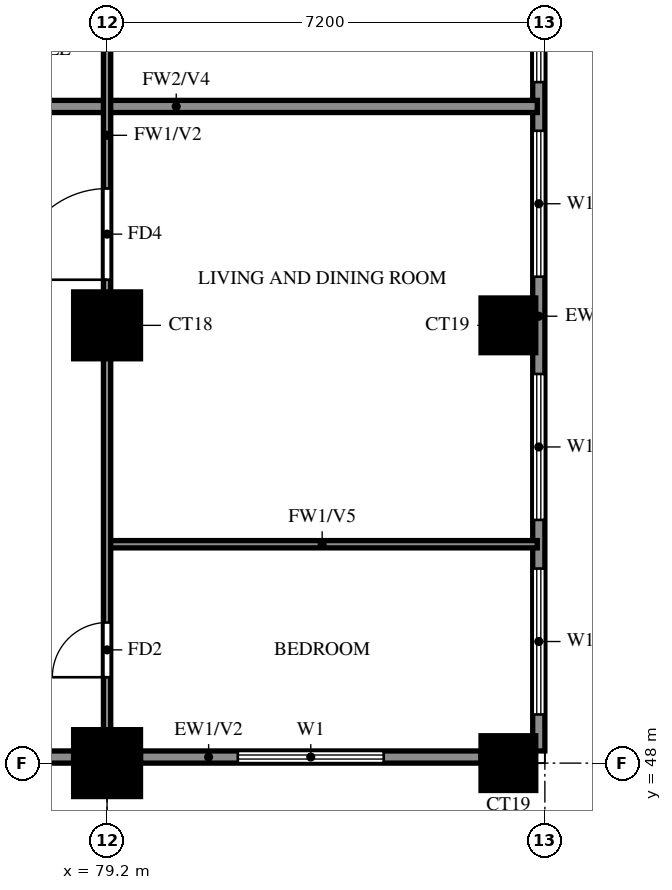
"""IFC4 building model, lengths in metres.
Left out: names, types, materials, properties, quantities, classifications, styles, units other than length and angle.
Written with IfcOpenShell. Run it as: python <this file> out.ifc"""

import sys

from ifc_helpers import new_model, si_unit, direction, frame, frame_2d, origin, origin_2d, place, context, subcontext, project, spatial, rectangle, extrude, source, transform, mapped, element, fill, save


model = new_model("IFC4")
c1 = context("Model", 3, precision=1e-05, world=origin(), true_north=direction((0.0, 1.0)))
c2 = subcontext(c1, "Body", "Model", "MODEL_VIEW")
j1 = project(units=[si_unit("LENGTHUNIT", "METRE"), si_unit("PLANEANGLEUNIT", "RADIAN")], contexts=[c1])
p1 = place(None, origin())
s1 = spatial("IfcSite", under=j1, at=p1, CompositionType="ELEMENT")
p2 = place(p1, origin())
s2 = spatial("IfcBuilding", under=s1, at=p2, CompositionType="ELEMENT")
p3 = place(p2, frame((0.0, 0.0, 116.5)))
s3 = spatial("IfcBuildingStorey", under=s2, at=p3, CompositionType="ELEMENT", Elevation=116.5)
m1 = source(origin(), c2, "Body", "SweptSolid", [
    extrude(rectangle(XDim=1.1, YDim=1.1, at=origin_2d()), origin(), (0.0, 0.0, 1.0), 3.2),
])
p4 = place(p3, frame((79.2, 48.0, 0.0), z_axis=(0.0, 0.0, 1.0), x_axis=(1.0, 0.0, 0.0)))
e1 = element("IfcColumn", 1, at=p4, inside=s3, PredefinedType="COLUMN", context=c2, shape_type="MappedRepresentation", body=[
    mapped(m1, transform((0.0, 0.0, 0.0))),
])
m2 = source(origin(), c2, "Body", "SweptSolid", [
    extrude(rectangle(XDim=0.9, YDim=0.9, at=origin_2d()), origin(), (0.0, 0.0, 1.0), 3.2),
])
p5 = place(p3, frame((85.8, 48.0, 0.0), z_axis=(0.0, 0.0, 1.0), x_axis=(1.0, 0.0, 0.0)))
e2 = element("IfcColumn", 2, at=p5, inside=s3, PredefinedType="COLUMN", context=c2, shape_type="MappedRepresentation", body=[
    mapped(m2, transform((0.0, 0.0, 0.0))),
])
p6 = place(p3, frame((79.2, 55.2, 0.0), z_axis=(0.0, 0.0, 1.0), x_axis=(1.0, 0.0, 0.0)))
e3 = element("IfcColumn", 3, at=p6, inside=s3, PredefinedType="COLUMN", context=c2, shape_type="MappedRepresentation", body=[
    mapped(m1, transform((0.0, 0.0, 0.0))),
])
p7 = place(p3, frame((85.8, 55.2, 0.0), z_axis=(0.0, 0.0, 1.0), x_axis=(1.0, 0.0, 0.0)))
e4 = element("IfcColumn", 4, at=p7, inside=s3, PredefinedType="COLUMN", context=c2, shape_type="MappedRepresentation", body=[
    mapped(m2, transform((0.0, 0.0, 0.0))),
])
p8 = place(p3, frame((85.719, 39.881, 0.0), z_axis=(0.0, 0.0, 1.0), x_axis=(-0.86377618652, 0.503875678716, 0.0)))
e5 = element("IfcWall", 5, at=p8, inside=s3, PredefinedType="SOLIDWALL", context=c2, shape_type="SweptSolid", body=[
    extrude(rectangle(XDim=16.311, YDim=0.2, at=frame_2d((8.156, 0.0))), origin(), (0.0, 0.0, 1.0), 3.2),
])
p9 = place(p8, frame((13.326, 0.0, 1.5)))
e6 = element("IfcOpeningElement", 6, at=p9, cuts=e5, PredefinedType="OPENING", context=c2, shape_type="SweptSolid", body=[
    extrude(rectangle(XDim=0.9, YDim=0.9, at=frame_2d((0.45, 0.45))), frame((0.0, 0.11, 0.0), z_axis=(0.0, -1.0, 0.0), x_axis=(1.0, 0.0, 0.0)), (0.0, 0.0, 1.0), 0.22),
])
p10 = place(p3, frame((71.99, 48.1, 0.0), z_axis=(0.0, 0.0, 1.0), x_axis=(1.0, 0.0, 0.0)))
e7 = element("IfcWall", 7, at=p10, inside=s3, PredefinedType="SOLIDWALL", context=c2, shape_type="SweptSolid", body=[
    extrude(rectangle(XDim=6.66, YDim=0.2, at=frame_2d((3.33, 0.0))), origin(), (0.0, 0.0, 1.0), 3.2),
])
p11 = place(p10, frame((2.205, 0.0, 1.5)))
e8 = element("IfcOpeningElement", 8, at=p11, cuts=e7, PredefinedType="OPENING", context=c2, shape_type="SweptSolid", body=[
    extrude(rectangle(XDim=0.9, YDim=0.9, at=frame_2d((0.45, 0.45))), frame((0.0, 0.11, 0.0), z_axis=(0.0, -1.0, 0.0), x_axis=(1.0, 0.0, 0.0)), (0.0, 0.0, 1.0), 0.22),
])
p12 = place(p3, frame((79.75, 48.1, 0.0), z_axis=(0.0, 0.0, 1.0), x_axis=(1.0, 0.0, 0.0)))
e9 = element("IfcWall", 9, at=p12, inside=s3, PredefinedType="SOLIDWALL", context=c2, shape_type="SweptSolid", body=[
    extrude(rectangle(XDim=5.6, YDim=0.2, at=frame_2d((2.8, 0.0))), origin(), (0.0, 0.0, 1.0), 3.2),
])
p13 = place(p12, frame((1.6, 0.0, 0.6)))
e10 = element("IfcOpeningElement", 10, at=p13, cuts=e9, PredefinedType="OPENING", context=c2, shape_type="SweptSolid", body=[
    extrude(rectangle(XDim=2.4, YDim=2.4, at=frame_2d((1.2, 1.2))), frame((0.0, 0.11, 0.0), z_axis=(0.0, -1.0, 0.0), x_axis=(1.0, 0.0, 0.0)), (0.0, 0.0, 1.0), 0.22),
])
p14 = place(p3, frame((86.3, 48.2, 0.0), z_axis=(0.0, 0.0, 1.0), x_axis=(0.0, 1.0, 0.0)))
e11 = element("IfcWall", 11, at=p14, inside=s3, PredefinedType="SOLIDWALL", context=c2, shape_type="SweptSolid", body=[
    extrude(rectangle(XDim=28.6, YDim=0.2, at=frame_2d((14.3, 0.0))), origin(), (0.0, 0.0, 1.0), 3.2),
])
p15 = place(p14, frame((0.6, 0.0, 0.6)))
e12 = element("IfcOpeningElement", 12, at=p15, cuts=e11, PredefinedType="OPENING", context=c2, shape_type="SweptSolid", body=[
    extrude(rectangle(XDim=2.4, YDim=2.4, at=frame_2d((1.2, 1.2))), frame((0.0, 0.11, 0.0), z_axis=(0.0, -1.0, 0.0), x_axis=(1.0, 0.0, 0.0)), (0.0, 0.0, 1.0), 0.22),
])
p16 = place(p14, frame((3.8, 0.0, 0.6)))
e13 = element("IfcOpeningElement", 13, at=p16, cuts=e11, PredefinedType="OPENING", context=c2, shape_type="SweptSolid", body=[
    extrude(rectangle(XDim=2.4, YDim=2.4, at=frame_2d((1.2, 1.2))), frame((0.0, 0.11, 0.0), z_axis=(0.0, -1.0, 0.0), x_axis=(1.0, 0.0, 0.0)), (0.0, 0.0, 1.0), 0.22),
])
p17 = place(p14, frame((7.8, 0.0, 0.6)))
e14 = element("IfcOpeningElement", 14, at=p17, cuts=e11, PredefinedType="OPENING", context=c2, shape_type="SweptSolid", body=[
    extrude(rectangle(XDim=2.4, YDim=2.4, at=frame_2d((1.2, 1.2))), frame((0.0, 0.11, 0.0), z_axis=(0.0, -1.0, 0.0), x_axis=(1.0, 0.0, 0.0)), (0.0, 0.0, 1.0), 0.22),
])
p18 = place(p14, frame((11.0, 0.0, 0.6)))
e15 = element("IfcOpeningElement", 15, at=p18, cuts=e11, PredefinedType="OPENING", context=c2, shape_type="SweptSolid", body=[
    extrude(rectangle(XDim=2.4, YDim=2.4, at=frame_2d((1.2, 1.2))), frame((0.0, 0.11, 0.0), z_axis=(0.0, -1.0, 0.0), x_axis=(1.0, 0.0, 0.0)), (0.0, 0.0, 1.0), 0.22),
])
p19 = place(p14, frame((15.167, 0.0, 0.6)))
e16 = element("IfcOpeningElement", 16, at=p19, cuts=e11, PredefinedType="OPENING", context=c2, shape_type="SweptSolid", body=[
    extrude(rectangle(XDim=2.4, YDim=2.4, at=frame_2d((1.2, 1.2))), frame((0.0, 0.11, 0.0), z_axis=(0.0, -1.0, 0.0), x_axis=(1.0, 0.0, 0.0)), (0.0, 0.0, 1.0), 0.22),
])
p20 = place(p14, frame((18.033, 0.0, 0.6)))
e17 = element("IfcOpeningElement", 17, at=p20, cuts=e11, PredefinedType="OPENING", context=c2, shape_type="SweptSolid", body=[
    extrude(rectangle(XDim=2.4, YDim=2.4, at=frame_2d((1.2, 1.2))), frame((0.0, 0.11, 0.0), z_axis=(0.0, -1.0, 0.0), x_axis=(1.0, 0.0, 0.0)), (0.0, 0.0, 1.0), 0.22),
])
p21 = place(p14, frame((22.95, 0.0, 1.5)))
e18 = element("IfcOpeningElement", 18, at=p21, cuts=e11, PredefinedType="OPENING", context=c2, shape_type="SweptSolid", body=[
    extrude(rectangle(XDim=0.9, YDim=0.9, at=frame_2d((0.45, 0.45))), frame((0.0, 0.11, 0.0), z_axis=(0.0, -1.0, 0.0), x_axis=(1.0, 0.0, 0.0)), (0.0, 0.0, 1.0), 0.22),
])
p22 = place(p14, frame((25.4, 0.0, 0.6)))
e19 = element("IfcOpeningElement", 19, at=p22, cuts=e11, PredefinedType="OPENING", context=c2, shape_type="SweptSolid", body=[
    extrude(rectangle(XDim=2.4, YDim=2.4, at=frame_2d((1.2, 1.2))), frame((0.0, 0.11, 0.0), z_axis=(0.0, -1.0, 0.0), x_axis=(1.0, 0.0, 0.0)), (0.0, 0.0, 1.0), 0.22),
])
p23 = place(p3, frame((74.4, 58.8, 0.0), z_axis=(0.0, 0.0, 1.0), x_axis=(1.0, 0.0, 0.0)))
e20 = element("IfcWall", 20, at=p23, inside=s3, PredefinedType="SOLIDWALL", context=c2, shape_type="SweptSolid", body=[
    extrude(rectangle(XDim=11.875, YDim=0.2, at=frame_2d((5.938, 0.0))), origin(), (0.0, 0.0, 1.0), 2.3),
])
p24 = place(p3, frame((79.2, 51.6, 0.0), z_axis=(0.0, 0.0, 1.0), x_axis=(1.0, 0.0, 0.0)))
e21 = element("IfcWall", 21, at=p24, inside=s3, PredefinedType="PARTITIONING", context=c2, shape_type="SweptSolid", body=[
    extrude(rectangle(XDim=7.075, YDim=0.12, at=frame_2d((3.538, 0.0))), origin(), (0.0, 0.0, 1.0), 2.3),
])
p25 = place(p3, frame((79.2, 48.125, 0.0), z_axis=(0.0, 0.0, 1.0), x_axis=(0.0, 1.0, 0.0)))
e22 = element("IfcWall", 22, at=p25, inside=s3, PredefinedType="PARTITIONING", context=c2, shape_type="SweptSolid", body=[
    extrude(rectangle(XDim=21.475, YDim=0.12, at=frame_2d((10.738, 0.0))), origin(), (0.0, 0.0, 1.0), 3.2),
])
p26 = place(p25, frame((1.288, 0.0, 0.0)))
e23 = element("IfcOpeningElement", 23, at=p26, cuts=e22, PredefinedType="OPENING", context=c2, shape_type="SweptSolid", body=[
    extrude(rectangle(XDim=0.9, YDim=2.1, at=frame_2d((0.45, 1.05))), frame((0.0, 0.07, 0.0), z_axis=(0.0, -1.0, 0.0), x_axis=(1.0, 0.0, 0.0)), (0.0, 0.0, 1.0), 0.14),
])
p27 = place(p25, frame((7.825, 0.0, 0.0)))
e24 = element("IfcOpeningElement", 24, at=p27, cuts=e22, PredefinedType="OPENING", context=c2, shape_type="SweptSolid", body=[
    extrude(rectangle(XDim=1.5, YDim=2.1, at=frame_2d((0.75, 1.05))), frame((0.0, 0.07, 0.0), z_axis=(0.0, -1.0, 0.0), x_axis=(1.0, 0.0, 0.0)), (0.0, 0.0, 1.0), 0.14),
])
p28 = place(p25, frame((12.025, 0.0, 0.0)))
e25 = element("IfcOpeningElement", 25, at=p28, cuts=e22, PredefinedType="OPENING", context=c2, shape_type="SweptSolid", body=[
    extrude(rectangle(XDim=0.9, YDim=2.1, at=frame_2d((0.45, 1.05))), frame((0.0, 0.07, 0.0), z_axis=(0.0, -1.0, 0.0), x_axis=(1.0, 0.0, 0.0)), (0.0, 0.0, 1.0), 0.14),
])
p29 = place(p25, frame((17.425, 0.0, 0.0)))
e26 = element("IfcOpeningElement", 26, at=p29, cuts=e22, PredefinedType="OPENING", context=c2, shape_type="SweptSolid", body=[
    extrude(rectangle(XDim=0.9, YDim=2.1, at=frame_2d((0.45, 1.05))), frame((0.0, 0.07, 0.0), z_axis=(0.0, -1.0, 0.0), x_axis=(1.0, 0.0, 0.0)), (0.0, 0.0, 1.0), 0.14),
])
p30 = place(p13, origin())
e27 = element("IfcWindow", 27, at=p30, inside=s3, PartitioningType="DOUBLE_PANEL_VERTICAL", PredefinedType="WINDOW", context=c2, shape_type="SweptSolid", body=[
    extrude(rectangle(XDim=2.4, YDim=2.4, at=frame_2d((1.2, 1.2))), frame((0.0, 0.03, 0.0), z_axis=(0.0, -1.0, 0.0), x_axis=(1.0, 0.0, 0.0)), (0.0, 0.0, 1.0), 0.06),
])
fill(e10, e27)
p31 = place(p15, origin())
e28 = element("IfcWindow", 28, at=p31, inside=s3, PartitioningType="DOUBLE_PANEL_VERTICAL", PredefinedType="WINDOW", context=c2, shape_type="SweptSolid", body=[
    extrude(rectangle(XDim=2.4, YDim=2.4, at=frame_2d((1.2, 1.2))), frame((0.0, 0.03, 0.0), z_axis=(0.0, -1.0, 0.0), x_axis=(1.0, 0.0, 0.0)), (0.0, 0.0, 1.0), 0.06),
])
fill(e12, e28)
p32 = place(p16, origin())
e29 = element("IfcWindow", 29, at=p32, inside=s3, PartitioningType="DOUBLE_PANEL_VERTICAL", PredefinedType="WINDOW", context=c2, shape_type="SweptSolid", body=[
    extrude(rectangle(XDim=2.4, YDim=2.4, at=frame_2d((1.2, 1.2))), frame((0.0, 0.03, 0.0), z_axis=(0.0, -1.0, 0.0), x_axis=(1.0, 0.0, 0.0)), (0.0, 0.0, 1.0), 0.06),
])
fill(e13, e29)
p33 = place(p17, origin())
e30 = element("IfcWindow", 30, at=p33, inside=s3, PartitioningType="DOUBLE_PANEL_VERTICAL", PredefinedType="WINDOW", context=c2, shape_type="SweptSolid", body=[
    extrude(rectangle(XDim=2.4, YDim=2.4, at=frame_2d((1.2, 1.2))), frame((0.0, 0.03, 0.0), z_axis=(0.0, -1.0, 0.0), x_axis=(1.0, 0.0, 0.0)), (0.0, 0.0, 1.0), 0.06),
])
fill(e14, e30)
p34 = place(p18, origin())
e31 = element("IfcWindow", 31, at=p34, inside=s3, PartitioningType="DOUBLE_PANEL_VERTICAL", PredefinedType="WINDOW", context=c2, shape_type="SweptSolid", body=[
    extrude(rectangle(XDim=2.4, YDim=2.4, at=frame_2d((1.2, 1.2))), frame((0.0, 0.03, 0.0), z_axis=(0.0, -1.0, 0.0), x_axis=(1.0, 0.0, 0.0)), (0.0, 0.0, 1.0), 0.06),
])
fill(e15, e31)
p35 = place(p26, origin())
e32 = element("IfcDoor", 32, at=p35, inside=s3, OperationType="SINGLE_SWING_LEFT", PredefinedType="DOOR", context=c2, shape_type="SweptSolid", body=[
    extrude(rectangle(XDim=0.9, YDim=2.1, at=frame_2d((0.45, 1.05))), frame((0.0, 0.025, 0.0), z_axis=(0.0, -1.0, 0.0), x_axis=(1.0, 0.0, 0.0)), (0.0, 0.0, 1.0), 0.05),
])
fill(e23, e32)
p36 = place(p27, origin())
e33 = element("IfcDoor", 33, at=p36, inside=s3, OperationType="SINGLE_SWING_RIGHT", PredefinedType="DOOR", context=c2, shape_type="SweptSolid", body=[
    extrude(rectangle(XDim=1.5, YDim=2.1, at=frame_2d((0.75, 1.05))), frame((0.0, 0.025, 0.0), z_axis=(0.0, -1.0, 0.0), x_axis=(1.0, 0.0, 0.0)), (0.0, 0.0, 1.0), 0.05),
])
fill(e24, e33)
save(model, sys.argv[1])
